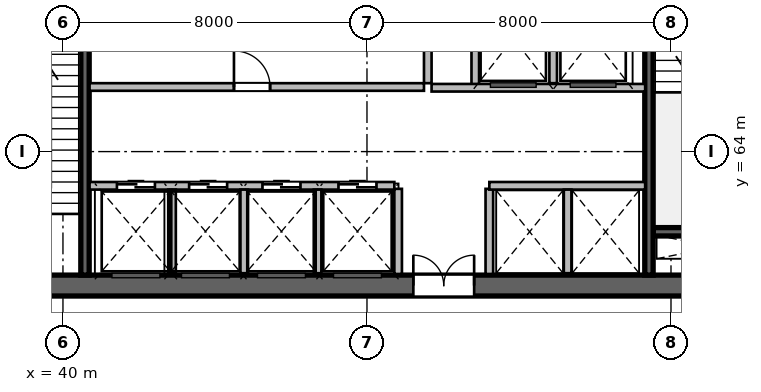
"""IFC4 building model, lengths in metres.
Left out: names, types, materials, properties, quantities, classifications, styles, units other than length and angle.
Written with IfcOpenShell. Run it as: python <this file> out.ifc"""

import sys

from ifc_helpers import new_model, si_unit, direction, frame, frame_2d, origin, place, context, subcontext, project, spatial, rectangle, extrude, source, transform, mapped, element, fill, save


model = new_model("IFC4")
c1 = context("Model", 3, precision=1e-05, world=origin(), true_north=direction((0.0, 1.0)))
c2 = subcontext(c1, "Body", "Model", "MODEL_VIEW")
j1 = project(units=[si_unit("LENGTHUNIT", "METRE"), si_unit("PLANEANGLEUNIT", "RADIAN")], contexts=[c1])
p1 = place(None, origin())
s1 = spatial("IfcSite", under=j1, at=p1, CompositionType="ELEMENT")
p2 = place(p1, origin())
s2 = spatial("IfcBuilding", under=s1, at=p2, CompositionType="ELEMENT")
p3 = place(p2, frame((0.0, 0.0, 24.0)))
s3 = spatial("IfcBuildingStorey", under=s2, at=p3, CompositionType="ELEMENT", Elevation=24.0)
m1 = source(origin(), c2, "Body", "SweptSolid", [
    extrude(rectangle(XDim=21.6, YDim=0.55, at=frame_2d((10.8, 0.0))), origin(), (0.0, 0.0, 1.0), 6.0),
])
p4 = place(p3, frame((37.2, 60.475, 0.0), z_axis=(0.0, 0.0, 1.0), x_axis=(1.0, 0.0, 0.0)))
e1 = element("IfcWall", 1, at=p4, inside=s3, PredefinedType="SHEAR", context=c2, shape_type="MappedRepresentation", body=[
    mapped(m1, transform((0.0, 0.0, 0.0), scale=1.0)),
])
p5 = place(p4, frame((1.1, 0.0, 0.0)))
e2 = element("IfcOpeningElement", 2, at=p5, cuts=e1, PredefinedType="OPENING", context=c2, shape_type="SweptSolid", body=[
    extrude(rectangle(XDim=1.15, YDim=2.15, at=frame_2d((0.575, 1.075))), frame((0.0, 0.285, 0.0), z_axis=(0.0, -1.0, 0.0), x_axis=(1.0, 0.0, 0.0)), (0.0, 0.0, 1.0), 0.57),
])
p6 = place(p4, frame((19.5, 0.0, 0.0)))
e3 = element("IfcOpeningElement", 3, at=p6, cuts=e1, PredefinedType="OPENING", context=c2, shape_type="SweptSolid", body=[
    extrude(rectangle(XDim=0.9, YDim=2.1, at=frame_2d((0.45, 1.05))), frame((0.0, 0.285, 0.0), z_axis=(0.0, -1.0, 0.0), x_axis=(1.0, 0.0, 0.0)), (0.0, 0.0, 1.0), 0.57),
])
p7 = place(p4, frame((12.02, 0.0, 0.0)))
e4 = element("IfcOpeningElement", 4, at=p7, cuts=e1, PredefinedType="OPENING", context=c2, shape_type="SweptSolid", body=[
    extrude(rectangle(XDim=1.6, YDim=2.15, at=frame_2d((0.8, 1.075))), frame((0.0, 0.285, 0.0), z_axis=(0.0, -1.0, 0.0), x_axis=(1.0, 0.0, 0.0)), (0.0, 0.0, 1.0), 0.57),
])
m2 = source(origin(), c2, "Body", "SweptSolid", [
    extrude(rectangle(XDim=3.27, YDim=0.22, at=frame_2d((1.635, 0.0))), origin(), (0.0, 0.0, 1.0), 6.0),
])
p8 = place(p3, frame((55.53, 61.89, 0.0), z_axis=(0.0, 0.0, 1.0), x_axis=(1.0, 0.0, 0.0)))
e5 = element("IfcWall", 5, at=p8, inside=s3, PredefinedType="SHEAR", context=c2, shape_type="MappedRepresentation", body=[
    mapped(m2, transform((0.0, 0.0, 0.0), scale=1.0)),
])
m3 = source(origin(), c2, "Body", "SweptSolid", [
    extrude(rectangle(XDim=10.9, YDim=0.22, at=frame_2d((5.45, 0.0))), origin(), (0.0, 0.0, 1.0), 6.0),
])
p9 = place(p3, frame((40.58, 60.75, 0.0), z_axis=(0.0, 0.0, 1.0), x_axis=(0.0, 1.0, 0.0)))
e6 = element("IfcWall", 6, at=p9, inside=s3, PredefinedType="SHEAR", context=c2, shape_type="MappedRepresentation", body=[
    mapped(m3, transform((0.0, 0.0, 0.0), scale=1.0)),
])
p10 = place(p3, frame((55.42, 60.75, 0.0), z_axis=(0.0, 0.0, 1.0), x_axis=(0.0, 1.0, 0.0)))
e7 = element("IfcWall", 7, at=p10, inside=s3, PredefinedType="SHEAR", context=c2, shape_type="MappedRepresentation", body=[
    mapped(m3, transform((0.0, 0.0, 0.0), scale=1.0)),
])
p11 = place(p10, frame((9.495, 0.0, 0.0)))
e8 = element("IfcOpeningElement", 8, at=p11, cuts=e7, PredefinedType="OPENING", context=c2, shape_type="SweptSolid", body=[
    extrude(rectangle(XDim=1.15, YDim=2.15, at=frame_2d((0.575, 1.075))), frame((0.0, 0.12, 0.0), z_axis=(0.0, -1.0, 0.0), x_axis=(1.0, 0.0, 0.0)), (0.0, 0.0, 1.0), 0.24),
])
m4 = source(origin(), c2, "Body", "SweptSolid", [
    extrude(rectangle(XDim=2.24, YDim=0.2, at=frame_2d((1.12, 0.0))), origin(), (0.0, 0.0, 1.0), 5.55),
])
for number, where, z_axis, x_axis in (
    (9, (48.82, 60.78, 0.0), (0.0, 0.0, 1.0), (0.0, 1.0, 0.0)),
    (10, (51.22, 60.78, 0.0), (0.0, 0.0, 1.0), (0.0, 1.0, 0.0)),
):
    element("IfcWall", number, at=place(p3, frame(where, z_axis=z_axis, x_axis=x_axis)), inside=s3, PredefinedType="SOLIDWALL", context=c2, shape_type="MappedRepresentation", body=[
        mapped(m4, transform((0.0, 0.0, 0.0), scale=1.0)),
    ])
m5 = source(origin(), c2, "Body", "SweptSolid", [
    extrude(rectangle(XDim=5.8, YDim=0.2, at=frame_2d((2.9, 0.0))), origin(), (0.0, 0.0, 1.0), 5.55),
])
p12 = place(p3, frame((49.6, 65.8, 0.0), z_axis=(0.0, 0.0, 1.0), x_axis=(0.0, 1.0, 0.0)))
e11 = element("IfcWall", 11, at=p12, inside=s3, PredefinedType="SOLIDWALL", context=c2, shape_type="MappedRepresentation", body=[
    mapped(m5, transform((0.0, 0.0, 0.0), scale=1.0)),
])
m6 = source(origin(), c2, "Body", "SweptSolid", [
    extrude(rectangle(XDim=2.58, YDim=0.2, at=frame_2d((1.29, 0.0))), origin(), (0.0, 0.0, 1.0), 5.55),
])
p13 = place(p3, frame((50.85, 65.68, 0.0), z_axis=(0.0, 0.0, 1.0), x_axis=(0.0, 1.0, 0.0)))
e12 = element("IfcWall", 12, at=p13, inside=s3, PredefinedType="SOLIDWALL", context=c2, shape_type="MappedRepresentation", body=[
    mapped(m6, transform((0.0, 0.0, 0.0), scale=1.0)),
])
m7 = source(origin(), c2, "Body", "SweptSolid", [
    extrude(rectangle(XDim=2.4, YDim=0.2, at=frame_2d((1.2, 0.0))), origin(), (0.0, 0.0, 1.0), 5.55),
])
p14 = place(p3, frame((52.9, 65.8, 0.0), z_axis=(0.0, 0.0, 1.0), x_axis=(0.0, 1.0, 0.0)))
e13 = element("IfcWall", 13, at=p14, inside=s3, PredefinedType="SOLIDWALL", context=c2, shape_type="MappedRepresentation", body=[
    mapped(m7, transform((0.0, 0.0, 0.0), scale=1.0)),
])
m8 = source(origin(), c2, "Body", "SweptSolid", [
    extrude(rectangle(XDim=5.62, YDim=0.2, at=frame_2d((2.81, 0.0))), origin(), (0.0, 0.0, 1.0), 5.55),
])
p15 = place(p3, frame((49.7, 65.68, 0.0), z_axis=(0.0, 0.0, 1.0), x_axis=(1.0, 0.0, 0.0)))
e14 = element("IfcWall", 14, at=p15, inside=s3, PredefinedType="SOLIDWALL", context=c2, shape_type="MappedRepresentation", body=[
    mapped(m8, transform((0.0, 0.0, 0.0), scale=1.0)),
])
m9 = source(origin(), c2, "Body", "SweptSolid", [
    extrude(rectangle(XDim=8.02, YDim=0.2, at=frame_2d((4.01, 0.0))), origin(), (0.0, 0.0, 1.0), 5.55),
])
p16 = place(p3, frame((40.7, 63.1, 0.0), z_axis=(0.0, 0.0, 1.0), x_axis=(1.0, 0.0, 0.0)))
e15 = element("IfcWall", 15, at=p16, inside=s3, PredefinedType="SOLIDWALL", context=c2, shape_type="MappedRepresentation", body=[
    mapped(m9, transform((0.0, 0.0, 0.0), scale=1.0)),
])
p17 = place(p16, frame((0.72, 0.0, 0.0)))
e16 = element("IfcOpeningElement", 16, at=p17, cuts=e15, PredefinedType="OPENING", context=c2, shape_type="SweptSolid", body=[
    extrude(rectangle(XDim=1.0, YDim=2.15, at=frame_2d((0.5, 1.075))), frame((0.0, 0.11, 0.0), z_axis=(0.0, -1.0, 0.0), x_axis=(1.0, 0.0, 0.0)), (0.0, 0.0, 1.0), 0.22),
])
p18 = place(p16, frame((2.62, 0.0, 0.0)))
e17 = element("IfcOpeningElement", 17, at=p18, cuts=e15, PredefinedType="OPENING", context=c2, shape_type="SweptSolid", body=[
    extrude(rectangle(XDim=1.0, YDim=2.15, at=frame_2d((0.5, 1.075))), frame((0.0, 0.11, 0.0), z_axis=(0.0, -1.0, 0.0), x_axis=(1.0, 0.0, 0.0)), (0.0, 0.0, 1.0), 0.22),
])
p19 = place(p16, frame((4.55, 0.0, 0.0)))
e18 = element("IfcOpeningElement", 18, at=p19, cuts=e15, PredefinedType="OPENING", context=c2, shape_type="SweptSolid", body=[
    extrude(rectangle(XDim=1.0, YDim=2.15, at=frame_2d((0.5, 1.075))), frame((0.0, 0.11, 0.0), z_axis=(0.0, -1.0, 0.0), x_axis=(1.0, 0.0, 0.0)), (0.0, 0.0, 1.0), 0.22),
])
p20 = place(p16, frame((6.55, 0.0, 0.0)))
e19 = element("IfcOpeningElement", 19, at=p20, cuts=e15, PredefinedType="OPENING", context=c2, shape_type="SweptSolid", body=[
    extrude(rectangle(XDim=1.0, YDim=2.15, at=frame_2d((0.5, 1.075))), frame((0.0, 0.11, 0.0), z_axis=(0.0, -1.0, 0.0), x_axis=(1.0, 0.0, 0.0)), (0.0, 0.0, 1.0), 0.22),
])
m10 = source(origin(), c2, "Body", "SweptSolid", [
    extrude(rectangle(XDim=4.1, YDim=0.2, at=frame_2d((2.05, 0.0))), origin(), (0.0, 0.0, 1.0), 5.55),
])
p21 = place(p3, frame((51.22, 63.1, 0.0), z_axis=(0.0, 0.0, 1.0), x_axis=(1.0, 0.0, 0.0)))
e20 = element("IfcWall", 20, at=p21, inside=s3, PredefinedType="SOLIDWALL", context=c2, shape_type="MappedRepresentation", body=[
    mapped(m10, transform((0.0, 0.0, 0.0), scale=1.0)),
])
m11 = source(origin(), c2, "Body", "SweptSolid", [
    extrude(rectangle(XDim=2.2, YDim=0.2, at=frame_2d((1.1, 0.0))), origin(), (0.0, 0.0, 1.0), 5.55),
])
for number, where, z_axis, x_axis in (
    (21, (42.87, 60.8, 0.0), (0.0, 0.0, 1.0), (0.0, 1.0, 0.0)),
    (22, (44.77, 60.8, 0.0), (0.0, 0.0, 1.0), (0.0, 1.0, 0.0)),
    (23, (46.7, 60.8, 0.0), (0.0, 0.0, 1.0), (0.0, 1.0, 0.0)),
    (24, (53.28, 60.8, 0.0), (0.0, 0.0, 1.0), (0.0, 1.0, 0.0)),
):
    element("IfcWall", number, at=place(p3, frame(where, z_axis=z_axis, x_axis=x_axis)), inside=s3, PredefinedType="SOLIDWALL", context=c2, shape_type="MappedRepresentation", body=[
        mapped(m11, transform((0.0, 0.0, 0.0), scale=1.0)),
    ])
m12 = source(origin(), c2, "Body", "SweptSolid", [
    extrude(rectangle(XDim=8.8, YDim=0.2, at=frame_2d((4.4, 0.0))), origin(), (0.0, 0.0, 1.0), 5.55),
])
p22 = place(p3, frame((40.7, 65.7, 0.0), z_axis=(0.0, 0.0, 1.0), x_axis=(1.0, 0.0, 0.0)))
e25 = element("IfcWall", 25, at=p22, inside=s3, PredefinedType="SOLIDWALL", context=c2, shape_type="MappedRepresentation", body=[
    mapped(m12, transform((0.0, 0.0, 0.0), scale=1.0)),
])
p23 = place(p22, frame((3.8, 0.0, 0.0)))
e26 = element("IfcOpeningElement", 26, at=p23, cuts=e25, PredefinedType="OPENING", context=c2, shape_type="SweptSolid", body=[
    extrude(rectangle(XDim=0.95, YDim=2.15, at=frame_2d((0.475, 1.075))), frame((0.0, 0.11, 0.0), z_axis=(0.0, -1.0, 0.0), x_axis=(1.0, 0.0, 0.0)), (0.0, 0.0, 1.0), 0.22),
])
m13 = source(origin(), c2, "Body", "SweptSolid", [
    extrude(rectangle(XDim=1.6, YDim=2.15, at=frame_2d((0.8, 1.075))), frame((0.0, 0.025, 0.0), z_axis=(0.0, -1.0, 0.0), x_axis=(1.0, 0.0, 0.0)), (0.0, 0.0, 1.0), 0.05),
])
p24 = place(p7, origin())
e27 = element("IfcDoor", 27, at=p24, inside=s3, OperationType="DOUBLE_DOOR_SINGLE_SWING", PredefinedType="DOOR", context=c2, shape_type="MappedRepresentation", body=[
    mapped(m13, transform((0.0, 0.0, 0.0), scale=1.0)),
])
fill(e4, e27)
m14 = source(origin(), c2, "Body", "SweptSolid", [
    extrude(rectangle(XDim=1.0, YDim=2.15, at=frame_2d((0.5, 1.075))), frame((0.0, 0.025, 0.0), z_axis=(0.0, -1.0, 0.0), x_axis=(1.0, 0.0, 0.0)), (0.0, 0.0, 1.0), 0.05),
])
p25 = place(p17, origin())
e28 = element("IfcDoor", 28, at=p25, inside=s3, OperationType="DOUBLE_DOOR_SLIDING", PredefinedType="DOOR", context=c2, shape_type="MappedRepresentation", body=[
    mapped(m14, transform((0.0, 0.0, 0.0), scale=1.0)),
])
fill(e16, e28)
p26 = place(p18, origin())
e29 = element("IfcDoor", 29, at=p26, inside=s3, OperationType="DOUBLE_DOOR_SLIDING", PredefinedType="DOOR", context=c2, shape_type="MappedRepresentation", body=[
    mapped(m14, transform((0.0, 0.0, 0.0), scale=1.0)),
])
fill(e17, e29)
p27 = place(p19, origin())
e30 = element("IfcDoor", 30, at=p27, inside=s3, OperationType="DOUBLE_DOOR_SLIDING", PredefinedType="DOOR", context=c2, shape_type="MappedRepresentation", body=[
    mapped(m14, transform((0.0, 0.0, 0.0), scale=1.0)),
])
fill(e18, e30)
p28 = place(p20, origin())
e31 = element("IfcDoor", 31, at=p28, inside=s3, OperationType="DOUBLE_DOOR_SLIDING", PredefinedType="DOOR", context=c2, shape_type="MappedRepresentation", body=[
    mapped(m14, transform((0.0, 0.0, 0.0), scale=1.0)),
])
fill(e19, e31)
m15 = source(origin(), c2, "Body", "SweptSolid", [
    extrude(rectangle(XDim=0.95, YDim=2.15, at=frame_2d((0.475, 1.075))), frame((0.0, 0.025, 0.0), z_axis=(0.0, -1.0, 0.0), x_axis=(1.0, 0.0, 0.0)), (0.0, 0.0, 1.0), 0.05),
])
p29 = place(p23, origin())
e32 = element("IfcDoor", 32, at=p29, inside=s3, OperationType="SINGLE_SWING_LEFT", PredefinedType="DOOR", context=c2, shape_type="MappedRepresentation", body=[
    mapped(m15, transform((0.0, 0.0, 0.0), scale=1.0)),
])
fill(e26, e32)
save(model, sys.argv[1])
